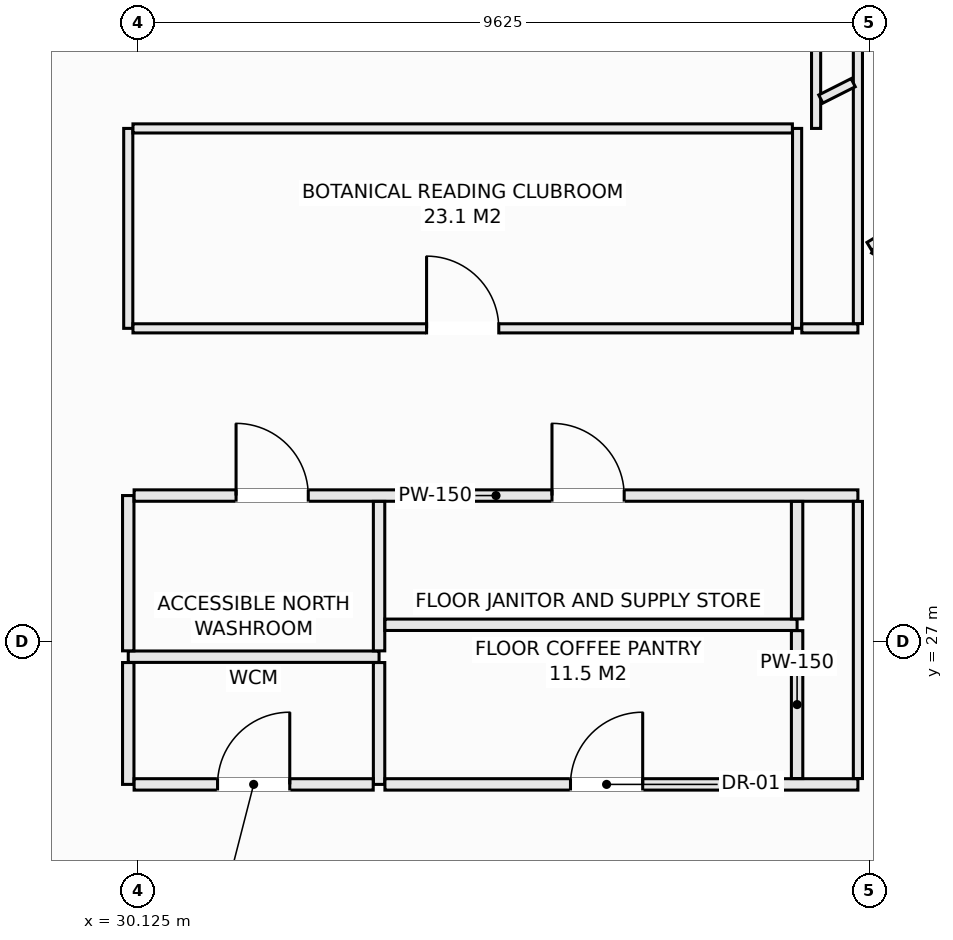
"""IFC4 building model, lengths in metres.
Left out: names, types, materials, properties, quantities, classifications, styles, units other than length and angle.
Written with IfcOpenShell. Run it as: python <this file> out.ifc"""

import sys

from ifc_helpers import new_model, si_unit, direction, frame, frame_2d, origin, place, context, subcontext, project, spatial, rectangle, extrude, element, fill, save


model = new_model("IFC4")
c1 = context("Model", 3, precision=1e-05, world=origin(), true_north=direction((0.0, 1.0)))
c2 = subcontext(c1, "Body", "Model", "MODEL_VIEW")
j1 = project(units=[si_unit("LENGTHUNIT", "METRE"), si_unit("PLANEANGLEUNIT", "RADIAN")], contexts=[c1])
p1 = place(None, origin())
s1 = spatial("IfcSite", under=j1, at=p1, CompositionType="ELEMENT")
p2 = place(p1, origin())
s2 = spatial("IfcBuilding", under=s1, at=p2, CompositionType="ELEMENT")
p3 = place(p2, frame((0.0, 0.0, 229.4)))
s3 = spatial("IfcBuildingStorey", under=s2, at=p3, CompositionType="ELEMENT", Elevation=229.4)
p4 = place(p3, frame((30.0, 26.8, 0.0), z_axis=(0.0, 0.0, 1.0), x_axis=(1.0, 0.0, 0.0)))
e1 = element("IfcWall", 1, at=p4, inside=s3, PredefinedType="PARTITIONING", context=c2, shape_type="SweptSolid", body=[
    extrude(rectangle(XDim=3.3, YDim=0.15, at=frame_2d((1.65, 0.0))), origin(), (0.0, 0.0, 1.0), 3.03),
])
p5 = place(p3, frame((30.0, 25.12, 0.0), z_axis=(0.0, 0.0, 1.0), x_axis=(0.0, 1.0, 0.0)))
e2 = element("IfcWall", 2, at=p5, inside=s3, PredefinedType="PARTITIONING", context=c2, shape_type="SweptSolid", body=[
    extrude(rectangle(XDim=1.603, YDim=0.15, at=frame_2d((0.801, 0.0))), origin(), (0.0, 0.0, 1.0), 3.03),
])
p6 = place(p3, frame((30.0, 26.877, 0.0), z_axis=(0.0, 0.0, 1.0), x_axis=(0.0, 1.0, 0.0)))
e3 = element("IfcWall", 3, at=p6, inside=s3, PredefinedType="PARTITIONING", context=c2, shape_type="SweptSolid", body=[
    extrude(rectangle(XDim=2.043, YDim=0.15, at=frame_2d((1.021, 0.0))), origin(), (0.0, 0.0, 1.0), 3.03),
])
p7 = place(p3, frame((30.0, 31.12, 0.0), z_axis=(0.0, 0.0, 1.0), x_axis=(0.0, 1.0, 0.0)))
e4 = element("IfcWall", 4, at=p7, inside=s3, PredefinedType="PARTITIONING", context=c2, shape_type="SweptSolid", body=[
    extrude(rectangle(XDim=2.63, YDim=0.12, at=frame_2d((1.315, 0.0))), origin(), (0.0, 0.0, 1.0), 3.03),
])
p8 = place(p3, frame((30.077, 28.92, 0.0), z_axis=(0.0, 0.0, 1.0), x_axis=(1.0, 0.0, 0.0)))
e5 = element("IfcWall", 5, at=p8, inside=s3, PredefinedType="PARTITIONING", context=c2, shape_type="SweptSolid", body=[
    extrude(rectangle(XDim=9.523, YDim=0.15, at=frame_2d((4.762, 0.0))), origin(), (0.0, 0.0, 1.0), 3.03),
])
p9 = place(p8, frame((1.342, 0.0, 0.0)))
e6 = element("IfcOpeningElement", 6, at=p9, cuts=e5, PredefinedType="OPENING", context=c2, shape_type="SweptSolid", body=[
    extrude(rectangle(XDim=0.95, YDim=2.1, at=frame_2d((0.475, 1.05))), frame((0.0, 0.085, 0.0), z_axis=(0.0, -1.0, 0.0), x_axis=(1.0, 0.0, 0.0)), (0.0, 0.0, 1.0), 0.17),
])
p10 = place(p8, frame((5.498, 0.0, 0.0)))
e7 = element("IfcOpeningElement", 7, at=p10, cuts=e5, PredefinedType="OPENING", context=c2, shape_type="SweptSolid", body=[
    extrude(rectangle(XDim=0.95, YDim=2.1, at=frame_2d((0.475, 1.05))), frame((0.0, 0.085, 0.0), z_axis=(0.0, -1.0, 0.0), x_axis=(1.0, 0.0, 0.0)), (0.0, 0.0, 1.0), 0.17),
])
p11 = place(p3, frame((33.3, 25.12, 0.0), z_axis=(0.0, 0.0, 1.0), x_axis=(0.0, 1.0, 0.0)))
e8 = element("IfcWall", 8, at=p11, inside=s3, PredefinedType="PARTITIONING", context=c2, shape_type="SweptSolid", body=[
    extrude(rectangle(XDim=1.603, YDim=0.15, at=frame_2d((0.801, 0.0))), origin(), (0.0, 0.0, 1.0), 3.03),
])
p12 = place(p3, frame((33.3, 26.877, 0.0), z_axis=(0.0, 0.0, 1.0), x_axis=(0.0, 1.0, 0.0)))
e9 = element("IfcWall", 9, at=p12, inside=s3, PredefinedType="PARTITIONING", context=c2, shape_type="SweptSolid", body=[
    extrude(rectangle(XDim=1.966, YDim=0.15, at=frame_2d((0.983, 0.0))), origin(), (0.0, 0.0, 1.0), 3.03),
])
p13 = place(p3, frame((30.077, 25.12, 0.0), z_axis=(0.0, 0.0, 1.0), x_axis=(1.0, 0.0, 0.0)))
e10 = element("IfcWall", 10, at=p13, inside=s3, PredefinedType="PARTITIONING", context=c2, shape_type="SweptSolid", body=[
    extrude(rectangle(XDim=3.146, YDim=0.15, at=frame_2d((1.573, 0.0))), origin(), (0.0, 0.0, 1.0), 3.03),
])
p14 = place(p13, frame((1.098, 0.0, 0.0)))
e11 = element("IfcOpeningElement", 11, at=p14, cuts=e10, PredefinedType="OPENING", context=c2, shape_type="SweptSolid", body=[
    extrude(rectangle(XDim=0.95, YDim=2.1, at=frame_2d((0.475, 1.05))), frame((0.0, 0.085, 0.0), z_axis=(0.0, -1.0, 0.0), x_axis=(1.0, 0.0, 0.0)), (0.0, 0.0, 1.0), 0.17),
])
p15 = place(p3, frame((33.377, 25.12, 0.0), z_axis=(0.0, 0.0, 1.0), x_axis=(1.0, 0.0, 0.0)))
e12 = element("IfcWall", 12, at=p15, inside=s3, PredefinedType="PARTITIONING", context=c2, shape_type="SweptSolid", body=[
    extrude(rectangle(XDim=6.223, YDim=0.15, at=frame_2d((3.112, 0.0))), origin(), (0.0, 0.0, 1.0), 3.03),
])
p16 = place(p15, frame((2.441, 0.0, 0.0)))
e13 = element("IfcOpeningElement", 13, at=p16, cuts=e12, PredefinedType="OPENING", context=c2, shape_type="SweptSolid", body=[
    extrude(rectangle(XDim=0.95, YDim=2.1, at=frame_2d((0.475, 1.05))), frame((0.0, 0.085, 0.0), z_axis=(0.0, -1.0, 0.0), x_axis=(1.0, 0.0, 0.0)), (0.0, 0.0, 1.0), 0.17),
])
p17 = place(p3, frame((33.377, 27.22, 0.0), z_axis=(0.0, 0.0, 1.0), x_axis=(1.0, 0.0, 0.0)))
e14 = element("IfcWall", 14, at=p17, inside=s3, PredefinedType="PARTITIONING", context=c2, shape_type="SweptSolid", body=[
    extrude(rectangle(XDim=5.423, YDim=0.15, at=frame_2d((2.711, 0.0))), origin(), (0.0, 0.0, 1.0), 3.03),
])
p18 = place(p3, frame((38.8, 25.197, 0.0), z_axis=(0.0, 0.0, 1.0), x_axis=(0.0, 1.0, 0.0)))
e15 = element("IfcWall", 15, at=p18, inside=s3, PredefinedType="PARTITIONING", context=c2, shape_type="SweptSolid", body=[
    extrude(rectangle(XDim=1.946, YDim=0.15, at=frame_2d((0.973, 0.0))), origin(), (0.0, 0.0, 1.0), 3.03),
])
p19 = place(p3, frame((38.8, 27.297, 0.0), z_axis=(0.0, 0.0, 1.0), x_axis=(0.0, 1.0, 0.0)))
e16 = element("IfcWall", 16, at=p19, inside=s3, PredefinedType="PARTITIONING", context=c2, shape_type="SweptSolid", body=[
    extrude(rectangle(XDim=1.546, YDim=0.15, at=frame_2d((0.773, 0.0))), origin(), (0.0, 0.0, 1.0), 3.03),
])
p20 = place(p3, frame((38.8, 31.12, 0.0), z_axis=(0.0, 0.0, 1.0), x_axis=(0.0, 1.0, 0.0)))
e17 = element("IfcWall", 17, at=p20, inside=s3, PredefinedType="PARTITIONING", context=c2, shape_type="SweptSolid", body=[
    extrude(rectangle(XDim=2.63, YDim=0.12, at=frame_2d((1.315, 0.0))), origin(), (0.0, 0.0, 1.0), 3.03),
])
p21 = place(p3, frame((30.062, 31.12, 0.0), z_axis=(0.0, 0.0, 1.0), x_axis=(1.0, 0.0, 0.0)))
e18 = element("IfcWall", 18, at=p21, inside=s3, PredefinedType="PARTITIONING", context=c2, shape_type="SweptSolid", body=[
    extrude(rectangle(XDim=8.676, YDim=0.12, at=frame_2d((4.338, 0.0))), origin(), (0.0, 0.0, 1.0), 3.03),
])
p22 = place(p21, frame((3.863, 0.0, 0.0)))
e19 = element("IfcOpeningElement", 19, at=p22, cuts=e18, PredefinedType="OPENING", context=c2, shape_type="SweptSolid", body=[
    extrude(rectangle(XDim=0.95, YDim=2.1, at=frame_2d((0.475, 1.05))), frame((0.0, 0.07, 0.0), z_axis=(0.0, -1.0, 0.0), x_axis=(1.0, 0.0, 0.0)), (0.0, 0.0, 1.0), 0.14),
])
p23 = place(p3, frame((38.862, 31.12, 0.0), z_axis=(0.0, 0.0, 1.0), x_axis=(1.0, 0.0, 0.0)))
e20 = element("IfcWall", 20, at=p23, inside=s3, PredefinedType="PARTITIONING", context=c2, shape_type="SweptSolid", body=[
    extrude(rectangle(XDim=0.738, YDim=0.12, at=frame_2d((0.369, 0.0))), origin(), (0.0, 0.0, 1.0), 3.03),
])
p24 = place(p3, frame((30.062, 33.75, 0.0), z_axis=(0.0, 0.0, 1.0), x_axis=(1.0, 0.0, 0.0)))
e21 = element("IfcWall", 21, at=p24, inside=s3, PredefinedType="PARTITIONING", context=c2, shape_type="SweptSolid", body=[
    extrude(rectangle(XDim=8.676, YDim=0.12, at=frame_2d((4.338, 0.0))), origin(), (0.0, 0.0, 1.0), 3.03),
])
p25 = place(p3, frame((39.05, 33.75, 0.0), z_axis=(0.0, 0.0, 1.0), x_axis=(0.0, 1.0, 0.0)))
e22 = element("IfcWall", 22, at=p25, inside=s3, PredefinedType="PARTITIONING", context=c2, shape_type="SweptSolid", body=[
    extrude(rectangle(XDim=1.938, YDim=0.12, at=frame_2d((0.969, 0.0))), origin(), (0.0, 0.0, 1.0), 3.03),
])
p26 = place(p3, frame((39.6, 25.197, 0.0), z_axis=(0.0, 0.0, 1.0), x_axis=(0.0, 1.0, 0.0)))
e23 = element("IfcWall", 23, at=p26, inside=s3, PredefinedType="PARTITIONING", context=c2, shape_type="SweptSolid", body=[
    extrude(rectangle(XDim=3.646, YDim=0.12, at=frame_2d((1.823, 0.0))), origin(), (0.0, 0.0, 1.0), 3.03),
])
p27 = place(p3, frame((39.6, 31.182, 0.0), z_axis=(0.0, 0.0, 1.0), x_axis=(0.0, 1.0, 0.0)))
e24 = element("IfcWall", 24, at=p27, inside=s3, PredefinedType="PARTITIONING", context=c2, shape_type="SweptSolid", body=[
    extrude(rectangle(XDim=6.318, YDim=0.12, at=frame_2d((3.159, 0.0))), origin(), (0.0, 0.0, 1.0), 3.03),
])
p28 = place(p3, frame((39.75, 32.199, 0.0), z_axis=(0.0, 0.0, 1.0), x_axis=(0.857702120906, 0.514146935996, 0.0)))
e25 = element("IfcWall", 25, at=p28, inside=s3, PredefinedType="PARTITIONING", context=c2, shape_type="SweptSolid", body=[
    extrude(rectangle(XDim=1.441, YDim=0.12, at=frame_2d((0.721, 0.0))), origin(), (0.0, 0.0, 1.0), 3.03),
])
p29 = place(p3, frame((39.81, 32.163, 0.0), z_axis=(0.0, 0.0, 1.0), x_axis=(0.858011245414, -0.513630901273, 0.0)))
e26 = element("IfcWall", 26, at=p29, inside=s3, PredefinedType="PARTITIONING", context=c2, shape_type="SweptSolid", body=[
    extrude(rectangle(XDim=1.37, YDim=0.12, at=frame_2d((0.685, 0.0))), origin(), (0.0, 0.0, 1.0), 3.03),
])
p30 = place(p3, frame((39.112, 34.137, 0.0), z_axis=(0.0, 0.0, 1.0), x_axis=(0.892681104984, 0.450688855869, 0.0)))
e27 = element("IfcWall", 27, at=p30, inside=s3, PredefinedType="PARTITIONING", context=c2, shape_type="SweptSolid", body=[
    extrude(rectangle(XDim=0.477, YDim=0.12, at=frame_2d((0.239, 0.0))), origin(), (0.0, 0.0, 1.0), 3.03),
])
p31 = place(p9, origin())
e28 = element("IfcDoor", 28, at=p31, inside=s3, OperationType="SINGLE_SWING_LEFT", PredefinedType="DOOR", context=c2, shape_type="SweptSolid", body=[
    extrude(rectangle(XDim=0.95, YDim=2.1, at=frame_2d((0.475, 1.05))), frame((0.0, 0.025, 0.0), z_axis=(0.0, -1.0, 0.0), x_axis=(1.0, 0.0, 0.0)), (0.0, 0.0, 1.0), 0.05),
])
fill(e6, e28)
p32 = place(p14, origin())
e29 = element("IfcDoor", 29, at=p32, inside=s3, OperationType="SINGLE_SWING_RIGHT", PredefinedType="DOOR", context=c2, shape_type="SweptSolid", body=[
    extrude(rectangle(XDim=0.95, YDim=2.1, at=frame_2d((0.475, 1.05))), frame((0.0, 0.025, 0.0), z_axis=(0.0, -1.0, 0.0), x_axis=(1.0, 0.0, 0.0)), (0.0, 0.0, 1.0), 0.05),
])
fill(e11, e29)
p33 = place(p10, origin())
e30 = element("IfcDoor", 30, at=p33, inside=s3, OperationType="SINGLE_SWING_LEFT", PredefinedType="DOOR", context=c2, shape_type="SweptSolid", body=[
    extrude(rectangle(XDim=0.95, YDim=2.1, at=frame_2d((0.475, 1.05))), frame((0.0, 0.025, 0.0), z_axis=(0.0, -1.0, 0.0), x_axis=(1.0, 0.0, 0.0)), (0.0, 0.0, 1.0), 0.05),
])
fill(e7, e30)
p34 = place(p16, origin())
e31 = element("IfcDoor", 31, at=p34, inside=s3, OperationType="SINGLE_SWING_RIGHT", PredefinedType="DOOR", context=c2, shape_type="SweptSolid", body=[
    extrude(rectangle(XDim=0.95, YDim=2.1, at=frame_2d((0.475, 1.05))), frame((0.0, 0.025, 0.0), z_axis=(0.0, -1.0, 0.0), x_axis=(1.0, 0.0, 0.0)), (0.0, 0.0, 1.0), 0.05),
])
fill(e13, e31)
p35 = place(p22, origin())
e32 = element("IfcDoor", 32, at=p35, inside=s3, OperationType="SINGLE_SWING_LEFT", PredefinedType="DOOR", context=c2, shape_type="SweptSolid", body=[
    extrude(rectangle(XDim=0.95, YDim=2.1, at=frame_2d((0.475, 1.05))), frame((0.0, 0.025, 0.0), z_axis=(0.0, -1.0, 0.0), x_axis=(1.0, 0.0, 0.0)), (0.0, 0.0, 1.0), 0.05),
])
fill(e19, e32)
save(model, sys.argv[1])
